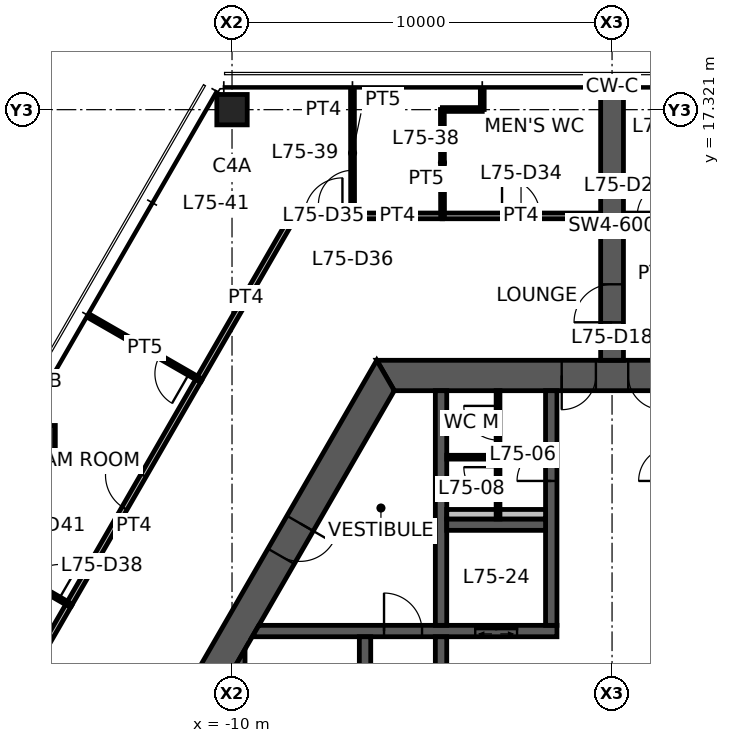
"""IFC4 building model, lengths in metres.
Left out: names, types, materials, properties, quantities, classifications, styles, units other than length and angle.
Written with IfcOpenShell. Run it as: python <this file> out.ifc"""

import sys

from ifc_helpers import new_model, si_unit, direction, frame, frame_2d, origin, origin_2d, place, context, subcontext, project, spatial, polyline, rectangle, hollow_rectangle, outline, extrude, element, fill, save


model = new_model("IFC4")
c1 = context("Model", 3, precision=1e-05, world=origin(), true_north=direction((0.0, 1.0)))
c2 = subcontext(c1, "Body", "Model", "MODEL_VIEW")
j1 = project(units=[si_unit("LENGTHUNIT", "METRE"), si_unit("PLANEANGLEUNIT", "RADIAN")], contexts=[c1])
p1 = place(None, origin())
s1 = spatial("IfcSite", under=j1, at=p1, CompositionType="ELEMENT")
p2 = place(p1, origin())
s2 = spatial("IfcBuilding", under=s1, at=p2, CompositionType="ELEMENT")
p3 = place(p2, frame((0.0, 0.0, 298.6)))
s3 = spatial("IfcBuildingStorey", under=s2, at=p3, CompositionType="ELEMENT", Elevation=298.6)
p4 = place(p3, frame((-10.0, 17.321, 0.0), z_axis=(0.0, 0.0, 1.0), x_axis=(1.0, 0.0, 0.0)))
e1 = element("IfcColumn", 1, at=p4, inside=s3, PredefinedType="COLUMN", context=c2, shape_type="SweptSolid", body=[
    extrude(hollow_rectangle(XDim=0.8, YDim=0.8, WallThickness=0.04, at=origin_2d()), origin(), (0.0, 0.0, 1.0), 3.9),
])
p5 = place(p3, frame((-15.0, 8.66, 0.0), z_axis=(0.0, 0.0, 1.0), x_axis=(1.0, 0.0, 0.0)))
e2 = element("IfcColumn", 2, at=p5, inside=s3, PredefinedType="COLUMN", context=c2, shape_type="SweptSolid", body=[
    extrude(hollow_rectangle(XDim=0.7, YDim=0.7, WallThickness=0.032, at=origin_2d()), origin(), (0.0, 0.0, 1.0), 3.9),
])
p6 = place(p3, frame((5.961, 10.325, 0.0), z_axis=(0.0, 0.0, 1.0), x_axis=(-1.0, 0.0, 0.0)))
e3 = element("IfcWall", 3, at=p6, inside=s3, PredefinedType="SHEAR", context=c2, shape_type="SweptSolid", body=[
    extrude(outline(polyline([(-0.231, -0.4), (4.636, -0.4), (5.536, -0.4), (6.386, -0.4), (7.286, -0.4), (12.153, -0.4), (11.691, 0.4), (7.286, 0.4), (6.386, 0.4), (5.536, 0.4), (4.636, 0.4), (0.231, 0.4), (-0.231, -0.4)])), origin(), (0.0, 0.0, 1.0), 3.9),
])
p7 = place(p6, frame((6.386, 0.0, 0.0)))
e4 = element("IfcOpeningElement", 4, at=p7, cuts=e3, PredefinedType="OPENING", context=c2, shape_type="SweptSolid", body=[
    extrude(rectangle(XDim=0.9, YDim=2.1, at=frame_2d((0.45, 1.05))), frame((0.0, 0.41, 0.0), z_axis=(0.0, -1.0, 0.0), x_axis=(1.0, 0.0, 0.0)), (0.0, 0.0, 1.0), 0.82),
])
p8 = place(p6, frame((4.636, 0.0, 0.0)))
e5 = element("IfcOpeningElement", 5, at=p8, cuts=e3, PredefinedType="OPENING", context=c2, shape_type="SweptSolid", body=[
    extrude(rectangle(XDim=0.9, YDim=2.1, at=frame_2d((0.45, 1.05))), frame((0.0, 0.41, 0.0), z_axis=(0.0, -1.0, 0.0), x_axis=(1.0, 0.0, 0.0)), (0.0, 0.0, 1.0), 0.82),
])
p9 = place(p3, frame((-5.961, 10.325, 0.0), z_axis=(0.0, 0.0, 1.0), x_axis=(-0.500004296715, -0.866022923061, 0.0)))
e6 = element("IfcWall", 6, at=p9, inside=s3, PredefinedType="SHEAR", context=c2, shape_type="SweptSolid", body=[
    extrude(outline(polyline([(-0.231, -0.4), (4.494, -0.4), (5.494, -0.4), (12.153, -0.4), (11.691, 0.4), (5.494, 0.4), (4.494, 0.4), (0.231, 0.4), (-0.231, -0.4)])), origin(), (0.0, 0.0, 1.0), 3.9),
])
p10 = place(p9, frame((4.494, 0.0, 0.0)))
e7 = element("IfcOpeningElement", 7, at=p10, cuts=e6, PredefinedType="OPENING", context=c2, shape_type="SweptSolid", body=[
    extrude(rectangle(XDim=1.0, YDim=2.1, at=frame_2d((0.5, 1.05))), frame((0.0, 0.41, 0.0), z_axis=(0.0, -1.0, 0.0), x_axis=(1.0, 0.0, 0.0)), (0.0, 0.0, 1.0), 0.82),
])
p11 = place(p3, frame((0.0, 10.725, 0.0), z_axis=(0.0, 0.0, 1.0), x_axis=(0.0, 1.0, 0.0)))
e8 = element("IfcWall", 8, at=p11, inside=s3, PredefinedType="SHEAR", context=c2, shape_type="SweptSolid", body=[
    extrude(rectangle(XDim=7.045, YDim=0.6, at=frame_2d((3.523, 0.0))), origin(), (0.0, 0.0, 1.0), 3.9),
])
p12 = place(p11, frame((1.0, 0.0, 0.0)))
e9 = element("IfcOpeningElement", 9, at=p12, cuts=e8, PredefinedType="OPENING", context=c2, shape_type="SweptSolid", body=[
    extrude(rectangle(XDim=1.0, YDim=2.1, at=frame_2d((0.5, 1.05))), frame((0.0, 0.31, 0.0), z_axis=(0.0, -1.0, 0.0), x_axis=(1.0, 0.0, 0.0)), (0.0, 0.0, 1.0), 0.62),
])
p13 = place(p3, frame((-9.382, 3.6, 0.0), z_axis=(0.0, 0.0, 1.0), x_axis=(1.0, 0.0, 0.0)))
e10 = element("IfcWall", 10, at=p13, inside=s3, PredefinedType="SHEAR", context=c2, shape_type="SweptSolid", body=[
    extrude(outline(polyline([(-0.087, -0.15), (3.382, -0.15), (4.382, -0.15), (5.782, -0.15), (6.882, -0.15), (7.932, -0.15), (7.932, 0.15), (6.882, 0.15), (5.782, 0.15), (4.382, 0.15), (3.382, 0.15), (0.087, 0.15), (-0.087, -0.15)])), origin(), (0.0, 0.0, 1.0), 3.9),
])
p14 = place(p13, frame((3.382, 0.0, 0.0)))
e11 = element("IfcOpeningElement", 11, at=p14, cuts=e10, PredefinedType="OPENING", context=c2, shape_type="SweptSolid", body=[
    extrude(rectangle(XDim=1.0, YDim=2.1, at=frame_2d((0.5, 1.05))), frame((0.0, 0.16, 0.0), z_axis=(0.0, -1.0, 0.0), x_axis=(1.0, 0.0, 0.0)), (0.0, 0.0, 1.0), 0.32),
])
p15 = place(p13, frame((5.782, 0.0, 0.0)))
e12 = element("IfcOpeningElement", 12, at=p15, cuts=e10, PredefinedType="OPENING", context=c2, shape_type="SweptSolid", body=[
    extrude(rectangle(XDim=1.1, YDim=2.1, at=frame_2d((0.55, 1.05))), frame((0.0, 0.16, 0.0), z_axis=(0.0, -1.0, 0.0), x_axis=(1.0, 0.0, 0.0)), (0.0, 0.0, 1.0), 0.32),
])
p16 = place(p3, frame((-1.6, 3.75, 0.0), z_axis=(0.0, 0.0, 1.0), x_axis=(0.0, 1.0, 0.0)))
e13 = element("IfcWall", 13, at=p16, inside=s3, PredefinedType="SHEAR", context=c2, shape_type="SweptSolid", body=[
    extrude(rectangle(XDim=6.175, YDim=0.3, at=frame_2d((3.087, 0.0))), origin(), (0.0, 0.0, 1.0), 3.9),
])
p17 = place(p16, frame((3.8, 0.0, 0.0)))
e14 = element("IfcOpeningElement", 14, at=p17, cuts=e13, PredefinedType="OPENING", context=c2, shape_type="SweptSolid", body=[
    extrude(rectangle(XDim=0.9, YDim=2.1, at=frame_2d((0.45, 1.05))), frame((0.0, 0.16, 0.0), z_axis=(0.0, -1.0, 0.0), x_axis=(1.0, 0.0, 0.0)), (0.0, 0.0, 1.0), 0.32),
])
p18 = place(p3, frame((-4.5, -3.45, 0.0), z_axis=(0.0, 0.0, 1.0), x_axis=(0.0, 1.0, 0.0)))
e15 = element("IfcWall", 15, at=p18, inside=s3, PredefinedType="SHEAR", context=c2, shape_type="SweptSolid", body=[
    extrude(rectangle(XDim=6.9, YDim=0.3, at=frame_2d((3.45, 0.0))), origin(), (0.0, 0.0, 1.0), 3.9),
])
p19 = place(p18, frame((2.95, 0.0, 0.0)))
e16 = element("IfcOpeningElement", 16, at=p19, cuts=e15, PredefinedType="OPENING", context=c2, shape_type="SweptSolid", body=[
    extrude(rectangle(XDim=1.0, YDim=2.1, at=frame_2d((0.5, 1.05))), frame((0.0, 0.16, 0.0), z_axis=(0.0, -1.0, 0.0), x_axis=(1.0, 0.0, 0.0)), (0.0, 0.0, 1.0), 0.32),
])
p20 = place(p3, frame((-6.5, -3.45, 0.0), z_axis=(0.0, 0.0, 1.0), x_axis=(0.0, 1.0, 0.0)))
e17 = element("IfcWall", 17, at=p20, inside=s3, PredefinedType="SHEAR", context=c2, shape_type="SweptSolid", body=[
    extrude(rectangle(XDim=6.9, YDim=0.3, at=frame_2d((3.45, 0.0))), origin(), (0.0, 0.0, 1.0), 3.9),
])
p21 = place(p20, frame((0.1, 0.0, 0.0)))
e18 = element("IfcOpeningElement", 18, at=p21, cuts=e17, PredefinedType="OPENING", context=c2, shape_type="SweptSolid", body=[
    extrude(rectangle(XDim=1.0, YDim=2.1, at=frame_2d((0.5, 1.05))), frame((0.0, 0.16, 0.0), z_axis=(0.0, -1.0, 0.0), x_axis=(1.0, 0.0, 0.0)), (0.0, 0.0, 1.0), 0.32),
])
p22 = place(p3, frame((-4.5, 3.75, 0.0), z_axis=(0.0, 0.0, 1.0), x_axis=(0.0, 1.0, 0.0)))
e19 = element("IfcWall", 19, at=p22, inside=s3, PredefinedType="SHEAR", context=c2, shape_type="SweptSolid", body=[
    extrude(rectangle(XDim=6.175, YDim=0.3, at=frame_2d((3.087, 0.0))), origin(), (0.0, 0.0, 1.0), 3.9),
])
p23 = place(p3, frame((-4.35, 6.4, 0.0), z_axis=(0.0, 0.0, 1.0), x_axis=(1.0, 0.0, 0.0)))
e20 = element("IfcWall", 20, at=p23, inside=s3, PredefinedType="SHEAR", context=c2, shape_type="SweptSolid", body=[
    extrude(rectangle(XDim=2.6, YDim=0.3, at=frame_2d((1.3, 0.0))), origin(), (0.0, 0.0, 1.0), 3.9),
])
p24 = place(p3, frame((-9.808, -2.862, 0.0), z_axis=(0.0, 0.0, 1.0), x_axis=(0.0, 1.0, 0.0)))
e21 = element("IfcWall", 21, at=p24, inside=s3, PredefinedType="SHEAR", context=c2, shape_type="SweptSolid", body=[
    extrude(outline(polyline([(-0.26, -0.15), (5.984, -0.15), (5.465, 0.15), (0.26, 0.15), (-0.26, -0.15)])), origin(), (0.0, 0.0, 1.0), 3.9),
])
p25 = place(p3, frame((-4.35, 6.675, 0.0), z_axis=(0.0, 0.0, 1.0), x_axis=(1.0, 0.0, 0.0)))
e22 = element("IfcWall", 22, at=p25, inside=s3, PredefinedType="PLUMBINGWALL", context=c2, shape_type="SweptSolid", body=[
    extrude(rectangle(XDim=2.6, YDim=0.25, at=frame_2d((1.3, 0.0))), origin(), (0.0, 0.0, 1.0), 3.9),
])
p26 = place(p3, frame((-3.0, 6.55, 0.0), z_axis=(0.0, 0.0, 1.0), x_axis=(0.0, 1.0, 0.0)))
e23 = element("IfcWall", 23, at=p26, inside=s3, PredefinedType="PARTITIONING", context=c2, shape_type="SweptSolid", body=[
    extrude(rectangle(XDim=3.375, YDim=0.1, at=frame_2d((1.688, 0.0))), origin(), (0.0, 0.0, 1.0), 2.35),
])
p27 = place(p26, frame((2.075, 0.0, 0.0)))
e24 = element("IfcOpeningElement", 24, at=p27, cuts=e23, PredefinedType="OPENING", context=c2, shape_type="SweptSolid", body=[
    extrude(rectangle(XDim=0.9, YDim=2.1, at=frame_2d((0.45, 1.05))), frame((0.0, 0.06, 0.0), z_axis=(0.0, -1.0, 0.0), x_axis=(1.0, 0.0, 0.0)), (0.0, 0.0, 1.0), 0.12),
])
p28 = place(p26, frame((0.462, 0.0, 0.0)))
e25 = element("IfcOpeningElement", 25, at=p28, cuts=e23, PredefinedType="OPENING", context=c2, shape_type="SweptSolid", body=[
    extrude(rectangle(XDim=0.9, YDim=2.1, at=frame_2d((0.45, 1.05))), frame((0.0, 0.06, 0.0), z_axis=(0.0, -1.0, 0.0), x_axis=(1.0, 0.0, 0.0)), (0.0, 0.0, 1.0), 0.12),
])
p29 = place(p3, frame((-3.05, 8.175, 0.0), z_axis=(0.0, 0.0, 1.0), x_axis=(-1.0, 0.0, 0.0)))
e26 = element("IfcWall", 26, at=p29, inside=s3, PredefinedType="PARTITIONING", context=c2, shape_type="SweptSolid", body=[
    extrude(rectangle(XDim=1.3, YDim=0.1, at=frame_2d((0.65, 0.0))), origin(), (0.0, 0.0, 1.0), 2.35),
])
p30 = place(p3, frame((0.32, 14.525, 0.0), z_axis=(0.0, 0.0, 1.0), x_axis=(1.0, 0.0, 0.0)))
e27 = element("IfcWall", 27, at=p30, inside=s3, PredefinedType="PARTITIONING", context=c2, shape_type="SweptSolid", body=[
    extrude(rectangle(XDim=1.585, YDim=0.15, at=frame_2d((0.792, 0.0))), origin(), (0.0, 0.0, 1.0), 2.35),
])
p31 = place(p30, frame((0.343, 0.0, 0.0)))
e28 = element("IfcOpeningElement", 28, at=p31, cuts=e27, PredefinedType="OPENING", context=c2, shape_type="SweptSolid", body=[
    extrude(rectangle(XDim=0.9, YDim=2.1, at=frame_2d((0.45, 1.05))), frame((0.0, 0.085, 0.0), z_axis=(0.0, -1.0, 0.0), x_axis=(1.0, 0.0, 0.0)), (0.0, 0.0, 1.0), 0.17),
])
p32 = place(p3, frame((-4.47, 14.525, 0.0), z_axis=(0.0, 0.0, 1.0), x_axis=(1.0, 0.0, 0.0)))
e29 = element("IfcWall", 29, at=p32, inside=s3, PredefinedType="PARTITIONING", context=c2, shape_type="SweptSolid", body=[
    extrude(rectangle(XDim=4.15, YDim=0.15, at=frame_2d((2.075, 0.0))), origin(), (0.0, 0.0, 1.0), 2.35),
])
p33 = place(p32, frame((1.575, 0.0, 0.0)))
e30 = element("IfcOpeningElement", 30, at=p33, cuts=e29, PredefinedType="OPENING", context=c2, shape_type="SweptSolid", body=[
    extrude(rectangle(XDim=1.0, YDim=2.1, at=frame_2d((0.5, 1.05))), frame((0.0, 0.085, 0.0), z_axis=(0.0, -1.0, 0.0), x_axis=(1.0, 0.0, 0.0)), (0.0, 0.0, 1.0), 0.17),
])
p34 = place(p3, frame((-6.836, 14.525, 0.0), z_axis=(0.0, 0.0, 1.0), x_axis=(1.0, 0.0, 0.0)))
e31 = element("IfcWall", 31, at=p34, inside=s3, PredefinedType="PARTITIONING", context=c2, shape_type="SweptSolid", body=[
    extrude(rectangle(XDim=2.376, YDim=0.15, at=frame_2d((1.188, 0.0))), origin(), (0.0, 0.0, 1.0), 2.35),
])
p35 = place(p3, frame((-8.363, 14.525, 0.0), z_axis=(0.0, 0.0, 1.0), x_axis=(1.0, 0.0, 0.0)))
e32 = element("IfcWall", 32, at=p35, inside=s3, PredefinedType="PARTITIONING", context=c2, shape_type="SweptSolid", body=[
    extrude(rectangle(XDim=1.536, YDim=0.15, at=frame_2d((0.768, 0.0))), origin(), (0.0, 0.0, 1.0), 2.35),
])
p36 = place(p35, frame((0.268, 0.0, 0.0)))
e33 = element("IfcOpeningElement", 33, at=p36, cuts=e32, PredefinedType="OPENING", context=c2, shape_type="SweptSolid", body=[
    extrude(rectangle(XDim=1.0, YDim=2.1, at=frame_2d((0.5, 1.05))), frame((0.0, 0.085, 0.0), z_axis=(0.0, -1.0, 0.0), x_axis=(1.0, 0.0, 0.0)), (0.0, 0.0, 1.0), 0.17),
])
p37 = place(p3, frame((-4.465, 17.325, 0.0), z_axis=(0.0, 0.0, 1.0), x_axis=(1.0, 0.0, 0.0)))
e34 = element("IfcWall", 34, at=p37, inside=s3, PredefinedType="PARTITIONING", context=c2, shape_type="SweptSolid", body=[
    extrude(rectangle(XDim=1.05, YDim=0.1, at=frame_2d((0.525, 0.0))), origin(), (0.0, 0.0, 1.0), 2.35),
])
p38 = place(p3, frame((-4.46, 14.525, 0.0), z_axis=(0.0, 0.0, 1.0), x_axis=(-0.001831019688, 0.999998323682, 0.0)))
e35 = element("IfcWall", 35, at=p38, inside=s3, PredefinedType="PARTITIONING", context=c2, shape_type="SweptSolid", body=[
    extrude(rectangle(XDim=2.8, YDim=0.1, at=frame_2d((1.4, 0.0))), origin(), (0.0, 0.0, 1.0), 2.35),
])
p39 = place(p3, frame((-3.415, 17.325, 0.0), z_axis=(0.0, 0.0, 1.0), x_axis=(0.0, 1.0, 0.0)))
e36 = element("IfcWall", 36, at=p39, inside=s3, PredefinedType="PARTITIONING", context=c2, shape_type="SweptSolid", body=[
    extrude(rectangle(XDim=0.476, YDim=0.1, at=frame_2d((0.238, 0.0))), origin(), (0.0, 0.0, 1.0), 2.35),
])
p40 = place(p3, frame((-6.826, 14.525, 0.0), z_axis=(0.0, 0.0, 1.0), x_axis=(-0.001401178566, 0.999999018349, 0.0)))
e37 = element("IfcWall", 37, at=p40, inside=s3, PredefinedType="PARTITIONING", context=c2, shape_type="SweptSolid", body=[
    extrude(rectangle(XDim=3.311, YDim=0.1, at=frame_2d((1.655, 0.0))), origin(), (0.0, 0.0, 1.0), 2.35),
])
p41 = place(p40, frame((0.3, 0.0, 0.0)))
e38 = element("IfcOpeningElement", 38, at=p41, cuts=e37, PredefinedType="OPENING", context=c2, shape_type="SweptSolid", body=[
    extrude(rectangle(XDim=0.9, YDim=2.1, at=frame_2d((0.45, 1.05))), frame((0.0, 0.06, 0.0), z_axis=(0.0, -1.0, 0.0), x_axis=(1.0, 0.0, 0.0)), (0.0, 0.0, 1.0), 0.12),
])
p42 = place(p3, frame((-10.874, 10.216, 0.0), z_axis=(0.0, 0.0, 1.0), x_axis=(0.499988457423, 0.866032067792, 0.0)))
e39 = element("IfcWall", 39, at=p42, inside=s3, PredefinedType="PARTITIONING", context=c2, shape_type="SweptSolid", body=[
    extrude(rectangle(XDim=4.952, YDim=0.15, at=frame_2d((2.476, 0.0))), origin(), (0.0, 0.0, 1.0), 2.35),
])
p43 = place(p3, frame((-15.997, 1.342, 0.0), z_axis=(0.0, 0.0, 1.0), x_axis=(0.500032973541, 0.866006365664, 0.0)))
e40 = element("IfcWall", 40, at=p43, inside=s3, PredefinedType="PARTITIONING", context=c2, shape_type="SweptSolid", body=[
    extrude(rectangle(XDim=3.426, YDim=0.15, at=frame_2d((1.713, 0.0))), origin(), (0.0, 0.0, 1.0), 2.35),
])
p44 = place(p3, frame((-14.289, 4.301, 0.0), z_axis=(0.0, 0.0, 1.0), x_axis=(0.500020088259, 0.866013805512, 0.0)))
e41 = element("IfcWall", 41, at=p44, inside=s3, PredefinedType="PARTITIONING", context=c2, shape_type="SweptSolid", body=[
    extrude(rectangle(XDim=6.84, YDim=0.15, at=frame_2d((3.42, 0.0))), origin(), (0.0, 0.0, 1.0), 2.35),
])
p45 = place(p44, frame((2.92, 0.0, 0.0)))
e42 = element("IfcOpeningElement", 42, at=p45, cuts=e41, PredefinedType="OPENING", context=c2, shape_type="SweptSolid", body=[
    extrude(rectangle(XDim=1.0, YDim=2.1, at=frame_2d((0.5, 1.05))), frame((0.0, 0.085, 0.0), z_axis=(0.0, -1.0, 0.0), x_axis=(1.0, 0.0, 0.0)), (0.0, 0.0, 1.0), 0.17),
])
p46 = place(p3, frame((-10.869, 10.224, 0.0), z_axis=(0.0, 0.0, 1.0), x_axis=(-0.866757761015, 0.498729369218, 0.0)))
e43 = element("IfcWall", 43, at=p46, inside=s3, PredefinedType="PARTITIONING", context=c2, shape_type="SweptSolid", body=[
    extrude(rectangle(XDim=3.286, YDim=0.1, at=frame_2d((1.643, 0.0))), origin(), (0.0, 0.0, 1.0), 2.35),
])
p47 = place(p46, frame((0.3, 0.0, 0.0)))
e44 = element("IfcOpeningElement", 44, at=p47, cuts=e43, PredefinedType="OPENING", context=c2, shape_type="SweptSolid", body=[
    extrude(rectangle(XDim=0.9, YDim=2.1, at=frame_2d((0.45, 1.05))), frame((0.0, 0.06, 0.0), z_axis=(0.0, -1.0, 0.0), x_axis=(1.0, 0.0, 0.0)), (0.0, 0.0, 1.0), 0.12),
])
p48 = place(p3, frame((-17.154, 5.96, 0.0), z_axis=(0.0, 0.0, 1.0), x_axis=(0.865342122637, -0.501181614577, 0.0)))
e45 = element("IfcWall", 45, at=p48, inside=s3, PredefinedType="PARTITIONING", context=c2, shape_type="SweptSolid", body=[
    extrude(rectangle(XDim=3.311, YDim=0.1, at=frame_2d((1.655, 0.0))), origin(), (0.0, 0.0, 1.0), 2.35),
])
p49 = place(p48, frame((2.111, 0.0, 0.0)))
e46 = element("IfcOpeningElement", 46, at=p49, cuts=e45, PredefinedType="OPENING", context=c2, shape_type="SweptSolid", body=[
    extrude(rectangle(XDim=0.9, YDim=2.1, at=frame_2d((0.45, 1.05))), frame((0.0, 0.06, 0.0), z_axis=(0.0, -1.0, 0.0), x_axis=(1.0, 0.0, 0.0)), (0.0, 0.0, 1.0), 0.12),
])
p50 = place(p3, frame((0.0, 17.771, 0.0), z_axis=(0.0, 0.0, 1.0), x_axis=(0.0, 1.0, 0.0)))
e47 = element("IfcWall", 47, at=p50, inside=s3, PredefinedType="PARTITIONING", context=c2, shape_type="SweptSolid", body=[
    extrude(rectangle(XDim=0.065, YDim=0.175, at=frame_2d((0.032, 0.0))), origin(), (0.0, 0.0, 1.0), 3.9),
])
p51 = place(p7, origin())
e48 = element("IfcDoor", 48, at=p51, inside=s3, OperationType="SINGLE_SWING_RIGHT", PredefinedType="DOOR", context=c2, shape_type="SweptSolid", body=[
    extrude(rectangle(XDim=0.9, YDim=2.1, at=frame_2d((0.45, 1.05))), frame((0.0, 0.025, 0.0), z_axis=(0.0, -1.0, 0.0), x_axis=(1.0, 0.0, 0.0)), (0.0, 0.0, 1.0), 0.05),
])
fill(e4, e48)
p52 = place(p8, origin())
e49 = element("IfcDoor", 49, at=p52, inside=s3, OperationType="SINGLE_SWING_LEFT", PredefinedType="DOOR", context=c2, shape_type="SweptSolid", body=[
    extrude(rectangle(XDim=0.9, YDim=2.1, at=frame_2d((0.45, 1.05))), frame((0.0, 0.025, 0.0), z_axis=(0.0, -1.0, 0.0), x_axis=(1.0, 0.0, 0.0)), (0.0, 0.0, 1.0), 0.05),
])
fill(e5, e49)
p53 = place(p10, origin())
e50 = element("IfcDoor", 50, at=p53, inside=s3, OperationType="SINGLE_SWING_LEFT", PredefinedType="DOOR", context=c2, shape_type="SweptSolid", body=[
    extrude(rectangle(XDim=1.0, YDim=2.1, at=frame_2d((0.5, 1.05))), frame((0.0, 0.025, 0.0), z_axis=(0.0, -1.0, 0.0), x_axis=(1.0, 0.0, 0.0)), (0.0, 0.0, 1.0), 0.05),
])
fill(e7, e50)
p54 = place(p14, origin())
e51 = element("IfcDoor", 51, at=p54, inside=s3, OperationType="SINGLE_SWING_LEFT", PredefinedType="DOOR", context=c2, shape_type="SweptSolid", body=[
    extrude(rectangle(XDim=1.0, YDim=2.1, at=frame_2d((0.5, 1.05))), frame((0.0, 0.025, 0.0), z_axis=(0.0, -1.0, 0.0), x_axis=(1.0, 0.0, 0.0)), (0.0, 0.0, 1.0), 0.05),
])
fill(e11, e51)
p55 = place(p17, origin())
e52 = element("IfcDoor", 52, at=p55, inside=s3, OperationType="SINGLE_SWING_LEFT", PredefinedType="DOOR", context=c2, shape_type="SweptSolid", body=[
    extrude(rectangle(XDim=0.9, YDim=2.1, at=frame_2d((0.45, 1.05))), frame((0.0, 0.025, 0.0), z_axis=(0.0, -1.0, 0.0), x_axis=(1.0, 0.0, 0.0)), (0.0, 0.0, 1.0), 0.05),
])
fill(e14, e52)
p56 = place(p12, origin())
e53 = element("IfcDoor", 53, at=p56, inside=s3, OperationType="SINGLE_SWING_LEFT", PredefinedType="DOOR", context=c2, shape_type="SweptSolid", body=[
    extrude(rectangle(XDim=1.0, YDim=2.1, at=frame_2d((0.5, 1.05))), frame((0.0, 0.025, 0.0), z_axis=(0.0, -1.0, 0.0), x_axis=(1.0, 0.0, 0.0)), (0.0, 0.0, 1.0), 0.05),
])
fill(e9, e53)
p57 = place(p27, origin())
e54 = element("IfcDoor", 54, at=p57, inside=s3, OperationType="SINGLE_SWING_RIGHT", PredefinedType="DOOR", context=c2, shape_type="SweptSolid", body=[
    extrude(rectangle(XDim=0.9, YDim=2.1, at=frame_2d((0.45, 1.05))), frame((0.0, 0.025, 0.0), z_axis=(0.0, -1.0, 0.0), x_axis=(1.0, 0.0, 0.0)), (0.0, 0.0, 1.0), 0.05),
])
fill(e24, e54)
p58 = place(p28, origin())
e55 = element("IfcDoor", 55, at=p58, inside=s3, OperationType="SINGLE_SWING_RIGHT", PredefinedType="DOOR", context=c2, shape_type="SweptSolid", body=[
    extrude(rectangle(XDim=0.9, YDim=2.1, at=frame_2d((0.45, 1.05))), frame((0.0, 0.025, 0.0), z_axis=(0.0, -1.0, 0.0), x_axis=(1.0, 0.0, 0.0)), (0.0, 0.0, 1.0), 0.05),
])
fill(e25, e55)
p59 = place(p31, origin())
e56 = element("IfcDoor", 56, at=p59, inside=s3, OperationType="SINGLE_SWING_RIGHT", PredefinedType="DOOR", context=c2, shape_type="SweptSolid", body=[
    extrude(rectangle(XDim=0.9, YDim=2.1, at=frame_2d((0.45, 1.05))), frame((0.0, 0.025, 0.0), z_axis=(0.0, -1.0, 0.0), x_axis=(1.0, 0.0, 0.0)), (0.0, 0.0, 1.0), 0.05),
])
fill(e28, e56)
p60 = place(p33, origin())
e57 = element("IfcDoor", 57, at=p60, inside=s3, OperationType="SINGLE_SWING_LEFT", PredefinedType="DOOR", context=c2, shape_type="SweptSolid", body=[
    extrude(rectangle(XDim=1.0, YDim=2.1, at=frame_2d((0.5, 1.05))), frame((0.0, 0.025, 0.0), z_axis=(0.0, -1.0, 0.0), x_axis=(1.0, 0.0, 0.0)), (0.0, 0.0, 1.0), 0.05),
])
fill(e30, e57)
p61 = place(p36, origin())
e58 = element("IfcDoor", 58, at=p61, inside=s3, OperationType="SINGLE_SWING_RIGHT", PredefinedType="DOOR", context=c2, shape_type="SweptSolid", body=[
    extrude(rectangle(XDim=1.0, YDim=2.1, at=frame_2d((0.5, 1.05))), frame((0.0, 0.025, 0.0), z_axis=(0.0, -1.0, 0.0), x_axis=(1.0, 0.0, 0.0)), (0.0, 0.0, 1.0), 0.05),
])
fill(e33, e58)
p62 = place(p41, origin())
e59 = element("IfcDoor", 59, at=p62, inside=s3, OperationType="SINGLE_SWING_LEFT", PredefinedType="DOOR", context=c2, shape_type="SweptSolid", body=[
    extrude(rectangle(XDim=0.9, YDim=2.1, at=frame_2d((0.45, 1.05))), frame((0.0, 0.025, 0.0), z_axis=(0.0, -1.0, 0.0), x_axis=(1.0, 0.0, 0.0)), (0.0, 0.0, 1.0), 0.05),
])
fill(e38, e59)
p63 = place(p45, origin())
e60 = element("IfcDoor", 60, at=p63, inside=s3, OperationType="SINGLE_SWING_RIGHT", PredefinedType="DOOR", context=c2, shape_type="SweptSolid", body=[
    extrude(rectangle(XDim=1.0, YDim=2.1, at=frame_2d((0.5, 1.05))), frame((0.0, 0.025, 0.0), z_axis=(0.0, -1.0, 0.0), x_axis=(1.0, 0.0, 0.0)), (0.0, 0.0, 1.0), 0.05),
])
fill(e42, e60)
p64 = place(p47, origin())
e61 = element("IfcDoor", 61, at=p64, inside=s3, OperationType="SINGLE_SWING_LEFT", PredefinedType="DOOR", context=c2, shape_type="SweptSolid", body=[
    extrude(rectangle(XDim=0.9, YDim=2.1, at=frame_2d((0.45, 1.05))), frame((0.0, 0.025, 0.0), z_axis=(0.0, -1.0, 0.0), x_axis=(1.0, 0.0, 0.0)), (0.0, 0.0, 1.0), 0.05),
])
fill(e44, e61)
p65 = place(p49, origin())
e62 = element("IfcDoor", 62, at=p65, inside=s3, OperationType="SINGLE_SWING_RIGHT", PredefinedType="DOOR", context=c2, shape_type="SweptSolid", body=[
    extrude(rectangle(XDim=0.9, YDim=2.1, at=frame_2d((0.45, 1.05))), frame((0.0, 0.025, 0.0), z_axis=(0.0, -1.0, 0.0), x_axis=(1.0, 0.0, 0.0)), (0.0, 0.0, 1.0), 0.05),
])
fill(e46, e62)
p66 = place(p15, origin())
e63 = element("IfcDoor", 63, at=p66, inside=s3, OperationType="DOUBLE_DOOR_SLIDING", PredefinedType="DOOR", context=c2, shape_type="SweptSolid", body=[
    extrude(rectangle(XDim=1.1, YDim=2.1, at=frame_2d((0.55, 1.05))), frame((0.0, 0.025, 0.0), z_axis=(0.0, -1.0, 0.0), x_axis=(1.0, 0.0, 0.0)), (0.0, 0.0, 1.0), 0.05),
])
fill(e12, e63)
save(model, sys.argv[1])
